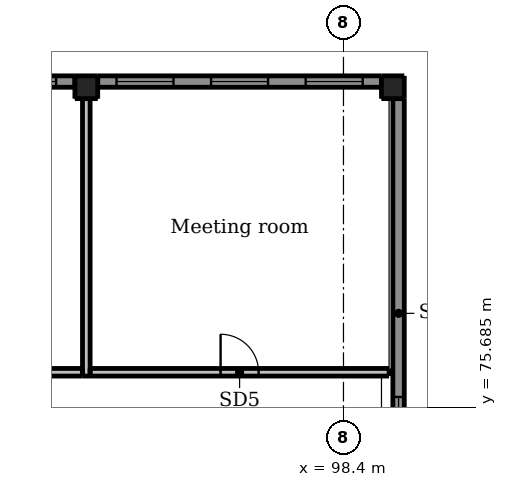
"""IFC4 building model, lengths in metres.
Left out: names, types, materials, properties, quantities, classifications, styles, units other than length and angle.
Written with IfcOpenShell. Run it as: python <this file> out.ifc"""

import sys

from ifc_helpers import new_model, si_unit, direction, frame, frame_2d, origin, origin_2d, place, context, subcontext, project, spatial, rectangle, extrude, element, fill, save


model = new_model("IFC4")
c1 = context("Model", 3, precision=1e-05, world=origin(), true_north=direction((0.0, 1.0)))
c2 = subcontext(c1, "Body", "Model", "MODEL_VIEW")
j1 = project(units=[si_unit("LENGTHUNIT", "METRE"), si_unit("PLANEANGLEUNIT", "RADIAN")], contexts=[c1])
p1 = place(None, origin())
s1 = spatial("IfcSite", under=j1, at=p1, CompositionType="ELEMENT")
p2 = place(p1, origin())
s2 = spatial("IfcBuilding", under=s1, at=p2, CompositionType="ELEMENT")
p3 = place(p2, frame((0.0, 0.0, 14.5)))
s3 = spatial("IfcBuildingStorey", under=s2, at=p3, CompositionType="ELEMENT", Elevation=14.5)
for number, where, z_axis, x_axis in (
    (1, (91.633, 84.1, -0.3), (0.0, 0.0, 1.0), (1.0, 0.0, 0.0)),
    (2, (99.7, 84.1, -0.3), (0.0, 0.0, 1.0), (1.0, 0.0, 0.0)),
):
    element("IfcColumn", number, at=place(p3, frame(where, z_axis=z_axis, x_axis=x_axis)), inside=s3, PredefinedType="COLUMN", context=c2, shape_type="SweptSolid", body=[
        extrude(rectangle(XDim=0.6, YDim=0.6, at=origin_2d()), origin(), (0.0, 0.0, 1.0), 4.5),
    ])
p4 = place(p3, frame((83.867, 84.25, 0.0), z_axis=(0.0, 0.0, 1.0), x_axis=(1.0, 0.0, 0.0)))
e3 = element("IfcWall", 3, at=p4, inside=s3, PredefinedType="SOLIDWALL", context=c2, shape_type="SweptSolid", body=[
    extrude(rectangle(XDim=7.466, YDim=0.3, at=frame_2d((3.733, 0.0))), origin(), (0.0, 0.0, 1.0), 3.3),
])
p5 = place(p4, frame((0.494, 0.0, 0.9)))
e4 = element("IfcOpeningElement", 4, at=p5, cuts=e3, PredefinedType="OPENING", context=c2, shape_type="SweptSolid", body=[
    extrude(rectangle(XDim=1.5, YDim=1.5, at=frame_2d((0.75, 0.75))), frame((0.0, 0.16, 0.0), z_axis=(0.0, -1.0, 0.0), x_axis=(1.0, 0.0, 0.0)), (0.0, 0.0, 1.0), 0.32),
])
p6 = place(p4, frame((2.983, 0.0, 0.9)))
e5 = element("IfcOpeningElement", 5, at=p6, cuts=e3, PredefinedType="OPENING", context=c2, shape_type="SweptSolid", body=[
    extrude(rectangle(XDim=1.5, YDim=1.5, at=frame_2d((0.75, 0.75))), frame((0.0, 0.16, 0.0), z_axis=(0.0, -1.0, 0.0), x_axis=(1.0, 0.0, 0.0)), (0.0, 0.0, 1.0), 0.32),
])
p7 = place(p4, frame((5.472, 0.0, 0.9)))
e6 = element("IfcOpeningElement", 6, at=p7, cuts=e3, PredefinedType="OPENING", context=c2, shape_type="SweptSolid", body=[
    extrude(rectangle(XDim=1.5, YDim=1.5, at=frame_2d((0.75, 0.75))), frame((0.0, 0.16, 0.0), z_axis=(0.0, -1.0, 0.0), x_axis=(1.0, 0.0, 0.0)), (0.0, 0.0, 1.0), 0.32),
])
p8 = place(p3, frame((91.933, 84.25, 0.0), z_axis=(0.0, 0.0, 1.0), x_axis=(1.0, 0.0, 0.0)))
e7 = element("IfcWall", 7, at=p8, inside=s3, PredefinedType="SOLIDWALL", context=c2, shape_type="SweptSolid", body=[
    extrude(rectangle(XDim=7.467, YDim=0.3, at=frame_2d((3.733, 0.0))), origin(), (0.0, 0.0, 1.0), 3.3),
])
p9 = place(p8, frame((0.494, 0.0, 0.9)))
e8 = element("IfcOpeningElement", 8, at=p9, cuts=e7, PredefinedType="OPENING", context=c2, shape_type="SweptSolid", body=[
    extrude(rectangle(XDim=1.5, YDim=1.5, at=frame_2d((0.75, 0.75))), frame((0.0, 0.16, 0.0), z_axis=(0.0, -1.0, 0.0), x_axis=(1.0, 0.0, 0.0)), (0.0, 0.0, 1.0), 0.32),
])
p10 = place(p8, frame((2.983, 0.0, 0.9)))
e9 = element("IfcOpeningElement", 9, at=p10, cuts=e7, PredefinedType="OPENING", context=c2, shape_type="SweptSolid", body=[
    extrude(rectangle(XDim=1.5, YDim=1.5, at=frame_2d((0.75, 0.75))), frame((0.0, 0.16, 0.0), z_axis=(0.0, -1.0, 0.0), x_axis=(1.0, 0.0, 0.0)), (0.0, 0.0, 1.0), 0.32),
])
p11 = place(p8, frame((5.472, 0.0, 0.9)))
e10 = element("IfcOpeningElement", 10, at=p11, cuts=e7, PredefinedType="OPENING", context=c2, shape_type="SweptSolid", body=[
    extrude(rectangle(XDim=1.5, YDim=1.5, at=frame_2d((0.75, 0.75))), frame((0.0, 0.16, 0.0), z_axis=(0.0, -1.0, 0.0), x_axis=(1.0, 0.0, 0.0)), (0.0, 0.0, 1.0), 0.32),
])
p12 = place(p3, frame((99.85, 72.5, 0.0), z_axis=(0.0, 0.0, 1.0), x_axis=(0.0, 1.0, 0.0)))
e11 = element("IfcWall", 11, at=p12, inside=s3, PredefinedType="SOLIDWALL", context=c2, shape_type="SweptSolid", body=[
    extrude(rectangle(XDim=11.3, YDim=0.3, at=frame_2d((5.65, 0.0))), origin(), (0.0, 0.0, 1.0), 3.1),
])
p13 = place(p12, frame((1.95, 0.0, 0.9)))
e12 = element("IfcOpeningElement", 12, at=p13, cuts=e11, PredefinedType="OPENING", context=c2, shape_type="SweptSolid", body=[
    extrude(rectangle(XDim=1.5, YDim=1.5, at=frame_2d((0.75, 0.75))), frame((0.0, 0.16, 0.0), z_axis=(0.0, -1.0, 0.0), x_axis=(1.0, 0.0, 0.0)), (0.0, 0.0, 1.0), 0.32),
])
p14 = place(p3, frame((83.667, 76.6, 0.0), z_axis=(0.0, 0.0, 1.0), x_axis=(1.0, 0.0, 0.0)))
e13 = element("IfcWall", 13, at=p14, inside=s3, PredefinedType="PARTITIONING", context=c2, shape_type="SweptSolid", body=[
    extrude(rectangle(XDim=7.866, YDim=0.2, at=frame_2d((3.933, 0.0))), origin(), (0.0, 0.0, 1.0), 3.1),
])
p15 = place(p14, frame((3.433, 0.0, 0.0)))
e14 = element("IfcOpeningElement", 14, at=p15, cuts=e13, PredefinedType="OPENING", context=c2, shape_type="SweptSolid", body=[
    extrude(rectangle(XDim=1.0, YDim=2.1, at=frame_2d((0.5, 1.05))), frame((0.0, 0.11, 0.0), z_axis=(0.0, -1.0, 0.0), x_axis=(1.0, 0.0, 0.0)), (0.0, 0.0, 1.0), 0.22),
])
p16 = place(p3, frame((91.733, 76.6, 0.0), z_axis=(0.0, 0.0, 1.0), x_axis=(1.0, 0.0, 0.0)))
e15 = element("IfcWall", 15, at=p16, inside=s3, PredefinedType="PARTITIONING", context=c2, shape_type="SweptSolid", body=[
    extrude(rectangle(XDim=7.867, YDim=0.2, at=frame_2d((3.934, 0.0))), origin(), (0.0, 0.0, 1.0), 3.1),
])
p17 = place(p16, frame((3.434, 0.0, 0.0)))
e16 = element("IfcOpeningElement", 16, at=p17, cuts=e15, PredefinedType="OPENING", context=c2, shape_type="SweptSolid", body=[
    extrude(rectangle(XDim=1.0, YDim=2.1, at=frame_2d((0.5, 1.05))), frame((0.0, 0.11, 0.0), z_axis=(0.0, -1.0, 0.0), x_axis=(1.0, 0.0, 0.0)), (0.0, 0.0, 1.0), 0.22),
])
p18 = place(p3, frame((91.633, 76.5, 0.0), z_axis=(0.0, 0.0, 1.0), x_axis=(0.0, 1.0, 0.0)))
e17 = element("IfcWall", 17, at=p18, inside=s3, PredefinedType="PARTITIONING", context=c2, shape_type="SweptSolid", body=[
    extrude(rectangle(XDim=7.3, YDim=0.2, at=frame_2d((3.65, 0.0))), origin(), (0.0, 0.0, 1.0), 3.1),
])
p19 = place(p7, origin())
e18 = element("IfcWindow", 18, at=p19, inside=s3, PartitioningType="DOUBLE_PANEL_HORIZONTAL", PredefinedType="WINDOW", context=c2, shape_type="SweptSolid", body=[
    extrude(rectangle(XDim=1.5, YDim=1.5, at=frame_2d((0.75, 0.75))), frame((0.0, 0.03, 0.0), z_axis=(0.0, -1.0, 0.0), x_axis=(1.0, 0.0, 0.0)), (0.0, 0.0, 1.0), 0.06),
])
fill(e6, e18)
p20 = place(p9, origin())
e19 = element("IfcWindow", 19, at=p20, inside=s3, PartitioningType="DOUBLE_PANEL_HORIZONTAL", PredefinedType="WINDOW", context=c2, shape_type="SweptSolid", body=[
    extrude(rectangle(XDim=1.5, YDim=1.5, at=frame_2d((0.75, 0.75))), frame((0.0, 0.03, 0.0), z_axis=(0.0, -1.0, 0.0), x_axis=(1.0, 0.0, 0.0)), (0.0, 0.0, 1.0), 0.06),
])
fill(e8, e19)
p21 = place(p10, origin())
e20 = element("IfcWindow", 20, at=p21, inside=s3, PartitioningType="DOUBLE_PANEL_HORIZONTAL", PredefinedType="WINDOW", context=c2, shape_type="SweptSolid", body=[
    extrude(rectangle(XDim=1.5, YDim=1.5, at=frame_2d((0.75, 0.75))), frame((0.0, 0.03, 0.0), z_axis=(0.0, -1.0, 0.0), x_axis=(1.0, 0.0, 0.0)), (0.0, 0.0, 1.0), 0.06),
])
fill(e9, e20)
p22 = place(p11, origin())
e21 = element("IfcWindow", 21, at=p22, inside=s3, PartitioningType="DOUBLE_PANEL_HORIZONTAL", PredefinedType="WINDOW", context=c2, shape_type="SweptSolid", body=[
    extrude(rectangle(XDim=1.5, YDim=1.5, at=frame_2d((0.75, 0.75))), frame((0.0, 0.03, 0.0), z_axis=(0.0, -1.0, 0.0), x_axis=(1.0, 0.0, 0.0)), (0.0, 0.0, 1.0), 0.06),
])
fill(e10, e21)
p23 = place(p13, origin())
e22 = element("IfcWindow", 22, at=p23, inside=s3, PartitioningType="DOUBLE_PANEL_HORIZONTAL", PredefinedType="WINDOW", context=c2, shape_type="SweptSolid", body=[
    extrude(rectangle(XDim=1.5, YDim=1.5, at=frame_2d((0.75, 0.75))), frame((0.0, 0.03, 0.0), z_axis=(0.0, -1.0, 0.0), x_axis=(1.0, 0.0, 0.0)), (0.0, 0.0, 1.0), 0.06),
])
fill(e12, e22)
p24 = place(p17, origin())
e23 = element("IfcDoor", 23, at=p24, inside=s3, OperationType="SINGLE_SWING_LEFT", PredefinedType="DOOR", context=c2, shape_type="SweptSolid", body=[
    extrude(rectangle(XDim=1.0, YDim=2.1, at=frame_2d((0.5, 1.05))), frame((0.0, 0.025, 0.0), z_axis=(0.0, -1.0, 0.0), x_axis=(1.0, 0.0, 0.0)), (0.0, 0.0, 1.0), 0.05),
])
fill(e16, e23)
save(model, sys.argv[1])
